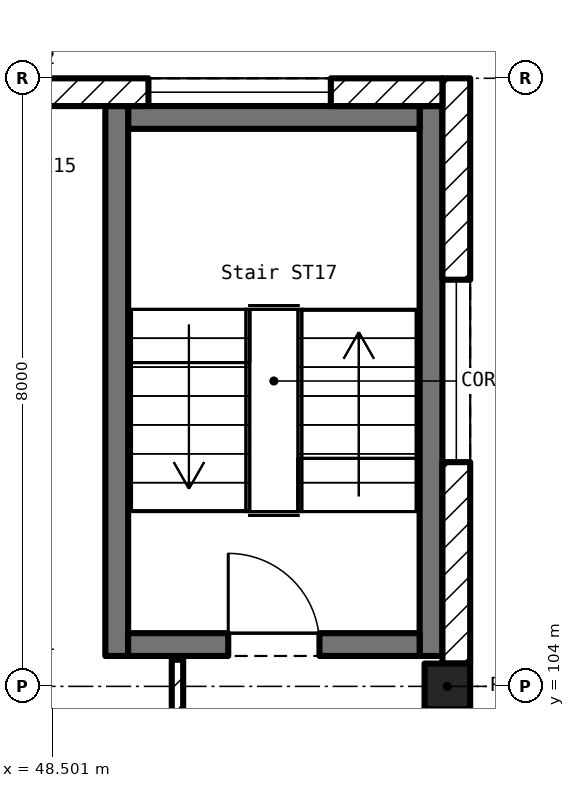
"""IFC4 building model, lengths in metres.
Left out: names, types, materials, properties, quantities, classifications, styles, units other than length and angle.
Written with IfcOpenShell. Run it as: python <this file> out.ifc"""

import sys

from ifc_helpers import new_model, si_unit, direction, frame, frame_2d, origin, origin_2d, place, context, subcontext, project, spatial, rectangle, extrude, element, fill, save


model = new_model("IFC4")
c1 = context("Model", 3, precision=1e-05, world=origin(), true_north=direction((0.0, 1.0)))
c2 = subcontext(c1, "Body", "Model", "MODEL_VIEW")
j1 = project(units=[si_unit("LENGTHUNIT", "METRE"), si_unit("PLANEANGLEUNIT", "RADIAN")], contexts=[c1])
p1 = place(None, origin())
s1 = spatial("IfcSite", under=j1, at=p1, CompositionType="ELEMENT")
p2 = place(p1, origin())
s2 = spatial("IfcBuilding", under=s1, at=p2, CompositionType="ELEMENT")
p3 = place(p2, frame((0.0, 0.0, 11.5)))
s3 = spatial("IfcBuildingStorey", under=s2, at=p3, CompositionType="ELEMENT", Elevation=11.5)
p4 = place(p3, frame((53.7, 104.0, 0.0), z_axis=(0.0, 0.0, 1.0), x_axis=(1.0, 0.0, 0.0)))
e1 = element("IfcColumn", 1, at=p4, inside=s3, PredefinedType="COLUMN", context=c2, shape_type="SweptSolid", body=[
    extrude(rectangle(XDim=0.6, YDim=0.6, at=origin_2d()), origin(), (0.0, 0.0, 1.0), 5.5),
])
p5 = place(p3, frame((53.818, 104.3, 0.0), z_axis=(0.0, 0.0, 1.0), x_axis=(0.0, 1.0, 0.0)))
e2 = element("IfcWall", 2, at=p5, inside=s3, PredefinedType="SOLIDWALL", context=c2, shape_type="SweptSolid", body=[
    extrude(rectangle(XDim=7.7, YDim=0.365, at=frame_2d((3.85, 0.0))), origin(), (0.0, 0.0, 1.0), 4.55),
])
p6 = place(p5, frame((2.65, 0.0, 1.0)))
e3 = element("IfcOpeningElement", 3, at=p6, cuts=e2, PredefinedType="OPENING", context=c2, shape_type="SweptSolid", body=[
    extrude(rectangle(XDim=2.4, YDim=2.0, at=frame_2d((1.2, 1.0))), frame((0.0, 0.195, 0.0), z_axis=(0.0, -1.0, 0.0), x_axis=(1.0, 0.0, 0.0)), (0.0, 0.0, 1.0), 0.389),
])
p7 = place(p3, frame((53.635, 111.817, 0.0), z_axis=(0.0, 0.0, 1.0), x_axis=(-1.0, 0.0, 0.0)))
e4 = element("IfcWall", 4, at=p7, inside=s3, PredefinedType="SOLIDWALL", context=c2, shape_type="SweptSolid", body=[
    extrude(rectangle(XDim=5.335, YDim=0.365, at=frame_2d((2.667, 0.0))), origin(), (0.0, 0.0, 1.0), 4.55),
])
p8 = place(p7, frame((1.468, 0.0, 1.0)))
e5 = element("IfcOpeningElement", 5, at=p8, cuts=e4, PredefinedType="OPENING", context=c2, shape_type="SweptSolid", body=[
    extrude(rectangle(XDim=2.4, YDim=2.0, at=frame_2d((1.2, 1.0))), frame((0.0, 0.195, 0.0), z_axis=(0.0, -1.0, 0.0), x_axis=(1.0, 0.0, 0.0)), (0.0, 0.0, 1.0), 0.389),
])
p9 = place(p3, frame((53.485, 104.4, 0.0), z_axis=(0.0, 0.0, 1.0), x_axis=(0.0, 1.0, 0.0)))
e6 = element("IfcWall", 6, at=p9, inside=s3, PredefinedType="SOLIDWALL", context=c2, shape_type="SweptSolid", body=[
    extrude(rectangle(XDim=7.235, YDim=0.3, at=frame_2d((3.618, 0.0))), origin(), (0.0, 0.0, 1.0), 5.5),
])
p10 = place(p3, frame((53.335, 111.485, 0.0), z_axis=(0.0, 0.0, 1.0), x_axis=(-1.0, 0.0, 0.0)))
e7 = element("IfcWall", 7, at=p10, inside=s3, PredefinedType="SOLIDWALL", context=c2, shape_type="SweptSolid", body=[
    extrude(rectangle(XDim=3.835, YDim=0.3, at=frame_2d((1.917, 0.0))), origin(), (0.0, 0.0, 1.0), 5.5),
])
p11 = place(p3, frame((49.35, 111.635, 0.0), z_axis=(0.0, 0.0, 1.0), x_axis=(0.0, -1.0, 0.0)))
e8 = element("IfcWall", 8, at=p11, inside=s3, PredefinedType="SOLIDWALL", context=c2, shape_type="SweptSolid", body=[
    extrude(rectangle(XDim=7.235, YDim=0.3, at=frame_2d((3.618, 0.0))), origin(), (0.0, 0.0, 1.0), 5.5),
])
p12 = place(p3, frame((49.5, 104.55, 0.0), z_axis=(0.0, 0.0, 1.0), x_axis=(1.0, 0.0, 0.0)))
e9 = element("IfcWall", 9, at=p12, inside=s3, PredefinedType="SOLIDWALL", context=c2, shape_type="SweptSolid", body=[
    extrude(rectangle(XDim=3.835, YDim=0.3, at=frame_2d((1.917, 0.0))), origin(), (0.0, 0.0, 1.0), 5.5),
])
p13 = place(p12, frame((1.317, 0.0, 0.0)))
e10 = element("IfcOpeningElement", 10, at=p13, cuts=e9, PredefinedType="OPENING", context=c2, shape_type="SweptSolid", body=[
    extrude(rectangle(XDim=1.2, YDim=2.1, at=frame_2d((0.6, 1.05))), frame((0.0, 0.162, 0.0), z_axis=(0.0, -1.0, 0.0), x_axis=(1.0, 0.0, 0.0)), (0.0, 0.0, 1.0), 0.324),
])
p14 = place(p3, frame((50.149, 104.35, 0.0), z_axis=(0.0, 0.0, 1.0), x_axis=(0.0, -1.0, 0.0)))
e11 = element("IfcWall", 11, at=p14, inside=s3, PredefinedType="PARTITIONING", context=c2, shape_type="SweptSolid", body=[
    extrude(rectangle(XDim=12.072, YDim=0.15, at=frame_2d((6.036, 0.0))), origin(), (0.0, 0.0, 1.0), 4.45),
])
p15 = place(p14, frame((5.561, 0.0, 0.0)))
e12 = element("IfcOpeningElement", 12, at=p15, cuts=e11, PredefinedType="OPENING", context=c2, shape_type="SweptSolid", body=[
    extrude(rectangle(XDim=0.9, YDim=2.1, at=frame_2d((0.45, 1.05))), frame((0.0, 0.087, 0.0), z_axis=(0.0, -1.0, 0.0), x_axis=(1.0, 0.0, 0.0)), (0.0, 0.0, 1.0), 0.174),
])
p16 = place(p6, origin())
e13 = element("IfcWindow", 13, at=p16, inside=s3, PartitioningType="DOUBLE_PANEL_VERTICAL", PredefinedType="WINDOW", context=c2, shape_type="SweptSolid", body=[
    extrude(rectangle(XDim=2.4, YDim=2.0, at=frame_2d((1.2, 1.0))), frame((0.0, 0.03, 0.0), z_axis=(0.0, -1.0, 0.0), x_axis=(1.0, 0.0, 0.0)), (0.0, 0.0, 1.0), 0.06),
])
fill(e3, e13)
p17 = place(p8, origin())
e14 = element("IfcWindow", 14, at=p17, inside=s3, PartitioningType="DOUBLE_PANEL_VERTICAL", PredefinedType="WINDOW", context=c2, shape_type="SweptSolid", body=[
    extrude(rectangle(XDim=2.4, YDim=2.0, at=frame_2d((1.2, 1.0))), frame((0.0, 0.03, 0.0), z_axis=(0.0, -1.0, 0.0), x_axis=(1.0, 0.0, 0.0)), (0.0, 0.0, 1.0), 0.06),
])
fill(e5, e14)
p18 = place(p13, origin())
e15 = element("IfcDoor", 15, at=p18, inside=s3, OperationType="SINGLE_SWING_LEFT", PredefinedType="DOOR", context=c2, shape_type="SweptSolid", body=[
    extrude(rectangle(XDim=1.2, YDim=2.1, at=frame_2d((0.6, 1.05))), frame((0.0, 0.025, 0.0), z_axis=(0.0, -1.0, 0.0), x_axis=(1.0, 0.0, 0.0)), (0.0, 0.0, 1.0), 0.05),
])
fill(e10, e15)
save(model, sys.argv[1])
